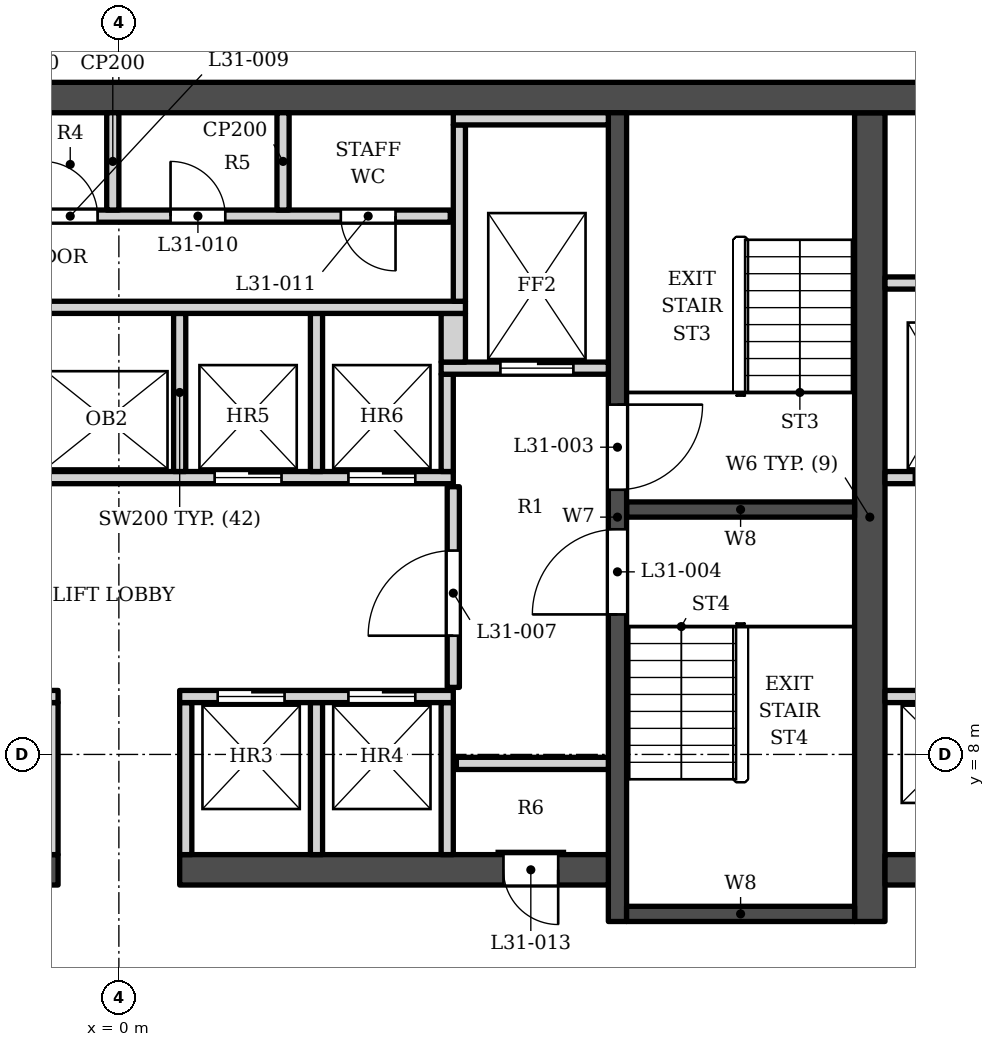
"""IFC4 building model, lengths in metres.
Left out: names, types, materials, properties, quantities, classifications, styles, units other than length and angle.
Written with IfcOpenShell. Run it as: python <this file> out.ifc"""

import sys

from ifc_helpers import new_model, si_unit, direction, frame, frame_2d, origin, place, context, subcontext, project, spatial, rectangle, extrude, element, fill, save


model = new_model("IFC4")
c1 = context("Model", 3, precision=1e-05, world=origin(), true_north=direction((0.0, 1.0)))
c2 = subcontext(c1, "Body", "Model", "MODEL_VIEW")
j1 = project(units=[si_unit("LENGTHUNIT", "METRE"), si_unit("PLANEANGLEUNIT", "RADIAN")], contexts=[c1])
p1 = place(None, origin())
s1 = spatial("IfcSite", under=j1, at=p1, CompositionType="ELEMENT")
p2 = place(p1, origin())
s2 = spatial("IfcBuilding", under=s1, at=p2, CompositionType="ELEMENT")
p3 = place(p2, frame((0.0, 0.0, 132.6)))
s3 = spatial("IfcBuildingStorey", under=s2, at=p3, CompositionType="ELEMENT", Elevation=132.6)
p4 = place(p3, frame((-16.9, 18.802, 0.0), z_axis=(0.0, 0.0, 1.0), x_axis=(1.0, 0.0, 0.0)))
e1 = element("IfcWall", 1, at=p4, inside=s3, PredefinedType="SHEAR", context=c2, shape_type="SweptSolid", body=[
    extrude(rectangle(XDim=33.8, YDim=0.5, at=frame_2d((16.9, 0.0))), origin(), (0.0, 0.0, 1.0), 7.0),
])
p5 = place(p3, frame((12.35, 5.253, 0.0), z_axis=(0.0, 0.0, 1.0), x_axis=(0.0, 1.0, 0.0)))
e2 = element("IfcWall", 2, at=p5, inside=s3, PredefinedType="SHEAR", context=c2, shape_type="SweptSolid", body=[
    extrude(rectangle(XDim=13.3, YDim=0.5, at=frame_2d((6.65, 0.0))), origin(), (0.0, 0.0, 1.0), 7.0),
])
p6 = place(p3, frame((8.2, 5.253, 0.0), z_axis=(0.0, 0.0, 1.0), x_axis=(0.0, 1.0, 0.0)))
e3 = element("IfcWall", 3, at=p6, inside=s3, PredefinedType="SHEAR", context=c2, shape_type="SweptSolid", body=[
    extrude(rectangle(XDim=13.3, YDim=0.3, at=frame_2d((6.65, 0.0))), origin(), (0.0, 0.0, 1.0), 7.0),
])
p7 = place(p6, frame((7.1, 0.0, 0.0)))
e4 = element("IfcOpeningElement", 4, at=p7, cuts=e3, PredefinedType="OPENING", context=c2, shape_type="SweptSolid", body=[
    extrude(rectangle(XDim=1.4, YDim=2.1, at=frame_2d((0.7, 1.05))), frame((0.0, 0.16, 0.0), z_axis=(0.0, -1.0, 0.0), x_axis=(1.0, 0.0, 0.0)), (0.0, 0.0, 1.0), 0.32),
])
p8 = place(p6, frame((5.05, 0.0, 0.0)))
e5 = element("IfcOpeningElement", 5, at=p8, cuts=e3, PredefinedType="OPENING", context=c2, shape_type="SweptSolid", body=[
    extrude(rectangle(XDim=1.4, YDim=2.1, at=frame_2d((0.7, 1.05))), frame((0.0, 0.16, 0.0), z_axis=(0.0, -1.0, 0.0), x_axis=(1.0, 0.0, 0.0)), (0.0, 0.0, 1.0), 0.32),
])
for number, where, z_axis, x_axis in (
    (6, (8.35, 12.028, 0.0), (0.0, 0.0, 1.0), (1.0, 0.0, 0.0)),
    (7, (8.35, 5.378, 0.0), (0.0, 0.0, 1.0), (1.0, 0.0, 0.0)),
):
    element("IfcWall", number, at=place(p3, frame(where, z_axis=z_axis, x_axis=x_axis)), inside=s3, PredefinedType="SHEAR", context=c2, shape_type="SweptSolid", body=[
        extrude(rectangle(XDim=3.75, YDim=0.25, at=frame_2d((1.875, 0.0))), origin(), (0.0, 0.0, 1.0), 7.0),
    ])
p9 = place(p3, frame((-8.05, 6.103, 0.0), z_axis=(0.0, 0.0, 1.0), x_axis=(1.0, 0.0, 0.0)))
e8 = element("IfcWall", 8, at=p9, inside=s3, PredefinedType="SHEAR", context=c2, shape_type="SweptSolid", body=[
    extrude(rectangle(XDim=7.05, YDim=0.5, at=frame_2d((3.525, 0.0))), origin(), (0.0, 0.0, 1.0), 7.0),
])
p10 = place(p9, frame((0.825, 0.0, 0.0)))
e9 = element("IfcOpeningElement", 9, at=p10, cuts=e8, PredefinedType="OPENING", context=c2, shape_type="SweptSolid", body=[
    extrude(rectangle(XDim=0.9, YDim=2.1, at=frame_2d((0.45, 1.05))), frame((0.0, 0.26, 0.0), z_axis=(0.0, -1.0, 0.0), x_axis=(1.0, 0.0, 0.0)), (0.0, 0.0, 1.0), 0.52),
])
p11 = place(p3, frame((1.0, 6.103, 0.0), z_axis=(0.0, 0.0, 1.0), x_axis=(1.0, 0.0, 0.0)))
e10 = element("IfcWall", 10, at=p11, inside=s3, PredefinedType="SHEAR", context=c2, shape_type="SweptSolid", body=[
    extrude(rectangle(XDim=7.05, YDim=0.5, at=frame_2d((3.525, 0.0))), origin(), (0.0, 0.0, 1.0), 7.0),
])
p12 = place(p11, frame((5.325, 0.0, 0.0)))
e11 = element("IfcOpeningElement", 11, at=p12, cuts=e10, PredefinedType="OPENING", context=c2, shape_type="SweptSolid", body=[
    extrude(rectangle(XDim=0.9, YDim=2.1, at=frame_2d((0.45, 1.05))), frame((0.0, 0.26, 0.0), z_axis=(0.0, -1.0, 0.0), x_axis=(1.0, 0.0, 0.0)), (0.0, 0.0, 1.0), 0.52),
])
p13 = place(p3, frame((12.6, 6.103, 0.0), z_axis=(0.0, 0.0, 1.0), x_axis=(1.0, 0.0, 0.0)))
e12 = element("IfcWall", 12, at=p13, inside=s3, PredefinedType="SHEAR", context=c2, shape_type="SweptSolid", body=[
    extrude(rectangle(XDim=4.3, YDim=0.5, at=frame_2d((2.15, 0.0))), origin(), (0.0, 0.0, 1.0), 7.0),
])
for number, where, z_axis, x_axis in (
    (13, (-1.1, 6.353, 0.0), (0.0, 0.0, 1.0), (0.0, 1.0, 0.0)),
    (14, (1.1, 6.353, 0.0), (0.0, 0.0, 1.0), (0.0, 1.0, 0.0)),
    (15, (3.25, 6.353, 0.0), (0.0, 0.0, 1.0), (0.0, 1.0, 0.0)),
    (16, (5.4, 6.353, 0.0), (0.0, 0.0, 1.0), (0.0, 1.0, 0.0)),
    (17, (5.55, 7.853, 0.0), (0.0, 0.0, 1.0), (1.0, 0.0, 0.0)),
):
    element("IfcWall", number, at=place(p3, frame(where, z_axis=z_axis, x_axis=x_axis)), inside=s3, PredefinedType="SOLIDWALL", context=c2, shape_type="SweptSolid", body=[
        extrude(rectangle(XDim=2.5, YDim=0.2, at=frame_2d((1.25, 0.0))), origin(), (0.0, 0.0, 1.0), 6.7),
    ])
p14 = place(p3, frame((-5.5, 8.953, 0.0), z_axis=(0.0, 0.0, 1.0), x_axis=(1.0, 0.0, 0.0)))
e18 = element("IfcWall", 18, at=p14, inside=s3, PredefinedType="SOLIDWALL", context=c2, shape_type="SweptSolid", body=[
    extrude(rectangle(XDim=4.5, YDim=0.2, at=frame_2d((2.25, 0.0))), origin(), (0.0, 0.0, 1.0), 6.7),
])
p15 = place(p14, frame((0.625, 0.0, 0.0)))
e19 = element("IfcOpeningElement", 19, at=p15, cuts=e18, PredefinedType="OPENING", context=c2, shape_type="SweptSolid", body=[
    extrude(rectangle(XDim=1.1, YDim=2.1, at=frame_2d((0.55, 1.05))), frame((0.0, 0.11, 0.0), z_axis=(0.0, -1.0, 0.0), x_axis=(1.0, 0.0, 0.0)), (0.0, 0.0, 1.0), 0.22),
])
p16 = place(p14, frame((2.775, 0.0, 0.0)))
e20 = element("IfcOpeningElement", 20, at=p16, cuts=e18, PredefinedType="OPENING", context=c2, shape_type="SweptSolid", body=[
    extrude(rectangle(XDim=1.1, YDim=2.1, at=frame_2d((0.55, 1.05))), frame((0.0, 0.11, 0.0), z_axis=(0.0, -1.0, 0.0), x_axis=(1.0, 0.0, 0.0)), (0.0, 0.0, 1.0), 0.22),
])
p17 = place(p3, frame((1.0, 8.953, 0.0), z_axis=(0.0, 0.0, 1.0), x_axis=(1.0, 0.0, 0.0)))
e21 = element("IfcWall", 21, at=p17, inside=s3, PredefinedType="SOLIDWALL", context=c2, shape_type="SweptSolid", body=[
    extrude(rectangle(XDim=4.5, YDim=0.2, at=frame_2d((2.25, 0.0))), origin(), (0.0, 0.0, 1.0), 6.7),
])
p18 = place(p17, frame((0.625, 0.0, 0.0)))
e22 = element("IfcOpeningElement", 22, at=p18, cuts=e21, PredefinedType="OPENING", context=c2, shape_type="SweptSolid", body=[
    extrude(rectangle(XDim=1.1, YDim=2.1, at=frame_2d((0.55, 1.05))), frame((0.0, 0.11, 0.0), z_axis=(0.0, -1.0, 0.0), x_axis=(1.0, 0.0, 0.0)), (0.0, 0.0, 1.0), 0.22),
])
p19 = place(p17, frame((2.775, 0.0, 0.0)))
e23 = element("IfcOpeningElement", 23, at=p19, cuts=e21, PredefinedType="OPENING", context=c2, shape_type="SweptSolid", body=[
    extrude(rectangle(XDim=1.1, YDim=2.1, at=frame_2d((0.55, 1.05))), frame((0.0, 0.11, 0.0), z_axis=(0.0, -1.0, 0.0), x_axis=(1.0, 0.0, 0.0)), (0.0, 0.0, 1.0), 0.22),
])
p20 = place(p3, frame((12.6, 8.953, 0.0), z_axis=(0.0, 0.0, 1.0), x_axis=(1.0, 0.0, 0.0)))
e24 = element("IfcWall", 24, at=p20, inside=s3, PredefinedType="SOLIDWALL", context=c2, shape_type="SweptSolid", body=[
    extrude(rectangle(XDim=4.3, YDim=0.2, at=frame_2d((2.15, 0.0))), origin(), (0.0, 0.0, 1.0), 6.7),
])
p21 = place(p20, frame((0.525, 0.0, 0.0)))
e25 = element("IfcOpeningElement", 25, at=p21, cuts=e24, PredefinedType="OPENING", context=c2, shape_type="SweptSolid", body=[
    extrude(rectangle(XDim=1.1, YDim=2.1, at=frame_2d((0.55, 1.05))), frame((0.0, 0.11, 0.0), z_axis=(0.0, -1.0, 0.0), x_axis=(1.0, 0.0, 0.0)), (0.0, 0.0, 1.0), 0.22),
])
p22 = place(p20, frame((2.775, 0.0, 0.0)))
e26 = element("IfcOpeningElement", 26, at=p22, cuts=e24, PredefinedType="OPENING", context=c2, shape_type="SweptSolid", body=[
    extrude(rectangle(XDim=1.1, YDim=2.1, at=frame_2d((0.55, 1.05))), frame((0.0, 0.11, 0.0), z_axis=(0.0, -1.0, 0.0), x_axis=(1.0, 0.0, 0.0)), (0.0, 0.0, 1.0), 0.22),
])
p23 = place(p3, frame((5.5, 9.103, 0.0), z_axis=(0.0, 0.0, 1.0), x_axis=(0.0, 1.0, 0.0)))
e27 = element("IfcWall", 27, at=p23, inside=s3, PredefinedType="SOLIDWALL", context=c2, shape_type="SweptSolid", body=[
    extrude(rectangle(XDim=3.3, YDim=0.2, at=frame_2d((1.65, 0.0))), origin(), (0.0, 0.0, 1.0), 6.7),
])
p24 = place(p23, frame((0.85, 0.0, 0.0)))
e28 = element("IfcOpeningElement", 28, at=p24, cuts=e27, PredefinedType="OPENING", context=c2, shape_type="SweptSolid", body=[
    extrude(rectangle(XDim=1.4, YDim=2.1, at=frame_2d((0.7, 1.05))), frame((0.0, 0.11, 0.0), z_axis=(0.0, -1.0, 0.0), x_axis=(1.0, 0.0, 0.0)), (0.0, 0.0, 1.0), 0.22),
])
p25 = place(p3, frame((-1.5, 12.552, 0.0), z_axis=(0.0, 0.0, 1.0), x_axis=(1.0, 0.0, 0.0)))
e29 = element("IfcWall", 29, at=p25, inside=s3, PredefinedType="SOLIDWALL", context=c2, shape_type="SweptSolid", body=[
    extrude(rectangle(XDim=7.0, YDim=0.2, at=frame_2d((3.5, 0.0))), origin(), (0.0, 0.0, 1.0), 6.7),
])
p26 = place(p25, frame((3.075, 0.0, 0.0)))
e30 = element("IfcOpeningElement", 30, at=p26, cuts=e29, PredefinedType="OPENING", context=c2, shape_type="SweptSolid", body=[
    extrude(rectangle(XDim=1.1, YDim=2.1, at=frame_2d((0.55, 1.05))), frame((0.0, 0.11, 0.0), z_axis=(0.0, -1.0, 0.0), x_axis=(1.0, 0.0, 0.0)), (0.0, 0.0, 1.0), 0.22),
])
p27 = place(p25, frame((5.275, 0.0, 0.0)))
e31 = element("IfcOpeningElement", 31, at=p27, cuts=e29, PredefinedType="OPENING", context=c2, shape_type="SweptSolid", body=[
    extrude(rectangle(XDim=1.1, YDim=2.1, at=frame_2d((0.55, 1.05))), frame((0.0, 0.11, 0.0), z_axis=(0.0, -1.0, 0.0), x_axis=(1.0, 0.0, 0.0)), (0.0, 0.0, 1.0), 0.22),
])
p28 = place(p3, frame((12.6, 12.552, 0.0), z_axis=(0.0, 0.0, 1.0), x_axis=(1.0, 0.0, 0.0)))
e32 = element("IfcWall", 32, at=p28, inside=s3, PredefinedType="SOLIDWALL", context=c2, shape_type="SweptSolid", body=[
    extrude(rectangle(XDim=4.3, YDim=0.2, at=frame_2d((2.15, 0.0))), origin(), (0.0, 0.0, 1.0), 6.7),
])
p29 = place(p28, frame((0.475, 0.0, 0.0)))
e33 = element("IfcOpeningElement", 33, at=p29, cuts=e32, PredefinedType="OPENING", context=c2, shape_type="SweptSolid", body=[
    extrude(rectangle(XDim=1.2, YDim=2.1, at=frame_2d((0.6, 1.05))), frame((0.0, 0.11, 0.0), z_axis=(0.0, -1.0, 0.0), x_axis=(1.0, 0.0, 0.0)), (0.0, 0.0, 1.0), 0.22),
])
p30 = place(p28, frame((2.625, 0.0, 0.0)))
e34 = element("IfcOpeningElement", 34, at=p30, cuts=e32, PredefinedType="OPENING", context=c2, shape_type="SweptSolid", body=[
    extrude(rectangle(XDim=1.4, YDim=2.1, at=frame_2d((0.7, 1.05))), frame((0.0, 0.11, 0.0), z_axis=(0.0, -1.0, 0.0), x_axis=(1.0, 0.0, 0.0)), (0.0, 0.0, 1.0), 0.22),
])
for number, where, z_axis, x_axis in (
    (35, (1.0, 12.653, 0.0), (0.0, 0.0, 1.0), (0.0, 1.0, 0.0)),
    (36, (3.25, 12.653, 0.0), (0.0, 0.0, 1.0), (0.0, 1.0, 0.0)),
):
    element("IfcWall", number, at=place(p3, frame(where, z_axis=z_axis, x_axis=x_axis)), inside=s3, PredefinedType="SOLIDWALL", context=c2, shape_type="SweptSolid", body=[
        extrude(rectangle(XDim=2.6, YDim=0.2, at=frame_2d((1.3, 0.0))), origin(), (0.0, 0.0, 1.0), 6.7),
    ])
p31 = place(p3, frame((5.4, 12.653, 0.0), z_axis=(0.0, 0.0, 1.0), x_axis=(0.0, 1.0, 0.0)))
e37 = element("IfcWall", 37, at=p31, inside=s3, PredefinedType="SOLIDWALL", context=c2, shape_type="SweptSolid", body=[
    extrude(rectangle(XDim=1.6, YDim=0.2, at=frame_2d((0.8, 0.0))), origin(), (0.0, 0.0, 1.0), 6.7),
])
p32 = place(p3, frame((5.3, 14.353, 0.0), z_axis=(0.0, 0.0, 1.0), x_axis=(1.0, 0.0, 0.0)))
e38 = element("IfcWall", 38, at=p32, inside=s3, PredefinedType="SOLIDWALL", context=c2, shape_type="SweptSolid", body=[
    extrude(rectangle(XDim=2.75, YDim=0.2, at=frame_2d((1.375, 0.0))), origin(), (0.0, 0.0, 1.0), 6.7),
])
p33 = place(p32, frame((0.975, 0.0, 0.0)))
e39 = element("IfcOpeningElement", 39, at=p33, cuts=e38, PredefinedType="OPENING", context=c2, shape_type="SweptSolid", body=[
    extrude(rectangle(XDim=1.2, YDim=2.1, at=frame_2d((0.6, 1.05))), frame((0.0, 0.11, 0.0), z_axis=(0.0, -1.0, 0.0), x_axis=(1.0, 0.0, 0.0)), (0.0, 0.0, 1.0), 0.22),
])
p34 = place(p3, frame((5.5, 14.453, 0.0), z_axis=(0.0, 0.0, 1.0), x_axis=(0.0, 1.0, 0.0)))
e40 = element("IfcWall", 40, at=p34, inside=s3, PredefinedType="SOLIDWALL", context=c2, shape_type="SweptSolid", body=[
    extrude(rectangle(XDim=0.8, YDim=0.4, at=frame_2d((0.4, 0.0))), origin(), (0.0, 0.0, 1.0), 6.7),
])
p35 = place(p3, frame((-1.5, 15.353, 0.0), z_axis=(0.0, 0.0, 1.0), x_axis=(1.0, 0.0, 0.0)))
e41 = element("IfcWall", 41, at=p35, inside=s3, PredefinedType="SOLIDWALL", context=c2, shape_type="SweptSolid", body=[
    extrude(rectangle(XDim=7.2, YDim=0.2, at=frame_2d((3.6, 0.0))), origin(), (0.0, 0.0, 1.0), 6.7),
])
p36 = place(p3, frame((5.6, 15.453, 0.0), z_axis=(0.0, 0.0, 1.0), x_axis=(0.0, 1.0, 0.0)))
e42 = element("IfcWall", 42, at=p36, inside=s3, PredefinedType="SOLIDWALL", context=c2, shape_type="SweptSolid", body=[
    extrude(rectangle(XDim=2.9, YDim=0.2, at=frame_2d((1.45, 0.0))), origin(), (0.0, 0.0, 1.0), 6.7),
])
p37 = place(p3, frame((12.6, 15.753, 0.0), z_axis=(0.0, 0.0, 1.0), x_axis=(1.0, 0.0, 0.0)))
e43 = element("IfcWall", 43, at=p37, inside=s3, PredefinedType="SOLIDWALL", context=c2, shape_type="SweptSolid", body=[
    extrude(rectangle(XDim=4.3, YDim=0.2, at=frame_2d((2.15, 0.0))), origin(), (0.0, 0.0, 1.0), 6.7),
])
p38 = place(p3, frame((-1.6, 16.853, 0.0), z_axis=(0.0, 0.0, 1.0), x_axis=(1.0, 0.0, 0.0)))
e44 = element("IfcWall", 44, at=p38, inside=s3, PredefinedType="SOLIDWALL", context=c2, shape_type="SweptSolid", body=[
    extrude(rectangle(XDim=7.05, YDim=0.2, at=frame_2d((3.525, 0.0))), origin(), (0.0, 0.0, 1.0), 6.7),
])
p39 = place(p38, frame((0.35, 0.0, 0.0)))
e45 = element("IfcOpeningElement", 45, at=p39, cuts=e44, PredefinedType="OPENING", context=c2, shape_type="SweptSolid", body=[
    extrude(rectangle(XDim=0.9, YDim=2.1, at=frame_2d((0.45, 1.05))), frame((0.0, 0.11, 0.0), z_axis=(0.0, -1.0, 0.0), x_axis=(1.0, 0.0, 0.0)), (0.0, 0.0, 1.0), 0.22),
])
p40 = place(p38, frame((2.45, 0.0, 0.0)))
e46 = element("IfcOpeningElement", 46, at=p40, cuts=e44, PredefinedType="OPENING", context=c2, shape_type="SweptSolid", body=[
    extrude(rectangle(XDim=0.9, YDim=2.1, at=frame_2d((0.45, 1.05))), frame((0.0, 0.11, 0.0), z_axis=(0.0, -1.0, 0.0), x_axis=(1.0, 0.0, 0.0)), (0.0, 0.0, 1.0), 0.22),
])
p41 = place(p38, frame((5.25, 0.0, 0.0)))
e47 = element("IfcOpeningElement", 47, at=p41, cuts=e44, PredefinedType="OPENING", context=c2, shape_type="SweptSolid", body=[
    extrude(rectangle(XDim=0.9, YDim=2.1, at=frame_2d((0.45, 1.05))), frame((0.0, 0.11, 0.0), z_axis=(0.0, -1.0, 0.0), x_axis=(1.0, 0.0, 0.0)), (0.0, 0.0, 1.0), 0.22),
])
for number, where, z_axis, x_axis in (
    (48, (-0.1, 16.953, 0.0), (0.0, 0.0, 1.0), (0.0, 1.0, 0.0)),
    (49, (2.7, 16.953, 0.0), (0.0, 0.0, 1.0), (0.0, 1.0, 0.0)),
):
    element("IfcWall", number, at=place(p3, frame(where, z_axis=z_axis, x_axis=x_axis)), inside=s3, PredefinedType="PARTITIONING", context=c2, shape_type="SweptSolid", body=[
        extrude(rectangle(XDim=1.6, YDim=0.2, at=frame_2d((0.8, 0.0))), origin(), (0.0, 0.0, 1.0), 6.7),
    ])
p42 = place(p3, frame((5.5, 18.453, 0.0), z_axis=(0.0, 0.0, 1.0), x_axis=(1.0, 0.0, 0.0)))
e50 = element("IfcWall", 50, at=p42, inside=s3, PredefinedType="SOLIDWALL", context=c2, shape_type="SweptSolid", body=[
    extrude(rectangle(XDim=2.55, YDim=0.2, at=frame_2d((1.275, 0.0))), origin(), (0.0, 0.0, 1.0), 6.7),
])
p43 = place(p18, origin())
e51 = element("IfcDoor", 51, at=p43, inside=s3, OperationType="DOUBLE_DOOR_SLIDING", PredefinedType="DOOR", context=c2, shape_type="SweptSolid", body=[
    extrude(rectangle(XDim=1.1, YDim=2.1, at=frame_2d((0.55, 1.05))), frame((0.0, 0.025, 0.0), z_axis=(0.0, -1.0, 0.0), x_axis=(1.0, 0.0, 0.0)), (0.0, 0.0, 1.0), 0.05),
])
fill(e22, e51)
p44 = place(p19, origin())
e52 = element("IfcDoor", 52, at=p44, inside=s3, OperationType="DOUBLE_DOOR_SLIDING", PredefinedType="DOOR", context=c2, shape_type="SweptSolid", body=[
    extrude(rectangle(XDim=1.1, YDim=2.1, at=frame_2d((0.55, 1.05))), frame((0.0, 0.025, 0.0), z_axis=(0.0, -1.0, 0.0), x_axis=(1.0, 0.0, 0.0)), (0.0, 0.0, 1.0), 0.05),
])
fill(e23, e52)
p45 = place(p26, origin())
e53 = element("IfcDoor", 53, at=p45, inside=s3, OperationType="DOUBLE_DOOR_SLIDING", PredefinedType="DOOR", context=c2, shape_type="SweptSolid", body=[
    extrude(rectangle(XDim=1.1, YDim=2.1, at=frame_2d((0.55, 1.05))), frame((0.0, 0.025, 0.0), z_axis=(0.0, -1.0, 0.0), x_axis=(1.0, 0.0, 0.0)), (0.0, 0.0, 1.0), 0.05),
])
fill(e30, e53)
p46 = place(p27, origin())
e54 = element("IfcDoor", 54, at=p46, inside=s3, OperationType="DOUBLE_DOOR_SLIDING", PredefinedType="DOOR", context=c2, shape_type="SweptSolid", body=[
    extrude(rectangle(XDim=1.1, YDim=2.1, at=frame_2d((0.55, 1.05))), frame((0.0, 0.025, 0.0), z_axis=(0.0, -1.0, 0.0), x_axis=(1.0, 0.0, 0.0)), (0.0, 0.0, 1.0), 0.05),
])
fill(e31, e54)
p47 = place(p33, origin())
e55 = element("IfcDoor", 55, at=p47, inside=s3, OperationType="DOUBLE_DOOR_SLIDING", PredefinedType="DOOR", context=c2, shape_type="SweptSolid", body=[
    extrude(rectangle(XDim=1.2, YDim=2.1, at=frame_2d((0.6, 1.05))), frame((0.0, 0.025, 0.0), z_axis=(0.0, -1.0, 0.0), x_axis=(1.0, 0.0, 0.0)), (0.0, 0.0, 1.0), 0.05),
])
fill(e39, e55)
p48 = place(p29, origin())
e56 = element("IfcDoor", 56, at=p48, inside=s3, OperationType="DOUBLE_DOOR_SLIDING", PredefinedType="DOOR", context=c2, shape_type="SweptSolid", body=[
    extrude(rectangle(XDim=1.2, YDim=2.1, at=frame_2d((0.6, 1.05))), frame((0.0, 0.025, 0.0), z_axis=(0.0, -1.0, 0.0), x_axis=(1.0, 0.0, 0.0)), (0.0, 0.0, 1.0), 0.05),
])
fill(e33, e56)
p49 = place(p7, origin())
e57 = element("IfcDoor", 57, at=p49, inside=s3, OperationType="SINGLE_SWING_RIGHT", PredefinedType="DOOR", context=c2, shape_type="SweptSolid", body=[
    extrude(rectangle(XDim=1.4, YDim=2.1, at=frame_2d((0.7, 1.05))), frame((0.0, 0.025, 0.0), z_axis=(0.0, -1.0, 0.0), x_axis=(1.0, 0.0, 0.0)), (0.0, 0.0, 1.0), 0.05),
])
fill(e4, e57)
p50 = place(p8, origin())
e58 = element("IfcDoor", 58, at=p50, inside=s3, OperationType="SINGLE_SWING_LEFT", PredefinedType="DOOR", context=c2, shape_type="SweptSolid", body=[
    extrude(rectangle(XDim=1.4, YDim=2.1, at=frame_2d((0.7, 1.05))), frame((0.0, 0.025, 0.0), z_axis=(0.0, -1.0, 0.0), x_axis=(1.0, 0.0, 0.0)), (0.0, 0.0, 1.0), 0.05),
])
fill(e5, e58)
p51 = place(p24, origin())
e59 = element("IfcDoor", 59, at=p51, inside=s3, OperationType="SINGLE_SWING_LEFT", PredefinedType="DOOR", context=c2, shape_type="SweptSolid", body=[
    extrude(rectangle(XDim=1.4, YDim=2.1, at=frame_2d((0.7, 1.05))), frame((0.0, 0.025, 0.0), z_axis=(0.0, -1.0, 0.0), x_axis=(1.0, 0.0, 0.0)), (0.0, 0.0, 1.0), 0.05),
])
fill(e28, e59)
p52 = place(p39, origin())
e60 = element("IfcDoor", 60, at=p52, inside=s3, OperationType="SINGLE_SWING_LEFT", PredefinedType="DOOR", context=c2, shape_type="SweptSolid", body=[
    extrude(rectangle(XDim=0.9, YDim=2.1, at=frame_2d((0.45, 1.05))), frame((0.0, 0.025, 0.0), z_axis=(0.0, -1.0, 0.0), x_axis=(1.0, 0.0, 0.0)), (0.0, 0.0, 1.0), 0.05),
])
fill(e45, e60)
p53 = place(p40, origin())
e61 = element("IfcDoor", 61, at=p53, inside=s3, OperationType="SINGLE_SWING_LEFT", PredefinedType="DOOR", context=c2, shape_type="SweptSolid", body=[
    extrude(rectangle(XDim=0.9, YDim=2.1, at=frame_2d((0.45, 1.05))), frame((0.0, 0.025, 0.0), z_axis=(0.0, -1.0, 0.0), x_axis=(1.0, 0.0, 0.0)), (0.0, 0.0, 1.0), 0.05),
])
fill(e46, e61)
p54 = place(p41, origin())
e62 = element("IfcDoor", 62, at=p54, inside=s3, OperationType="SINGLE_SWING_RIGHT", PredefinedType="DOOR", context=c2, shape_type="SweptSolid", body=[
    extrude(rectangle(XDim=0.9, YDim=2.1, at=frame_2d((0.45, 1.05))), frame((0.0, 0.025, 0.0), z_axis=(0.0, -1.0, 0.0), x_axis=(1.0, 0.0, 0.0)), (0.0, 0.0, 1.0), 0.05),
])
fill(e47, e62)
p55 = place(p12, origin())
e63 = element("IfcDoor", 63, at=p55, inside=s3, OperationType="SINGLE_SWING_RIGHT", PredefinedType="DOOR", context=c2, shape_type="SweptSolid", body=[
    extrude(rectangle(XDim=0.9, YDim=2.1, at=frame_2d((0.45, 1.05))), frame((0.0, 0.025, 0.0), z_axis=(0.0, -1.0, 0.0), x_axis=(1.0, 0.0, 0.0)), (0.0, 0.0, 1.0), 0.05),
])
fill(e11, e63)
save(model, sys.argv[1])
